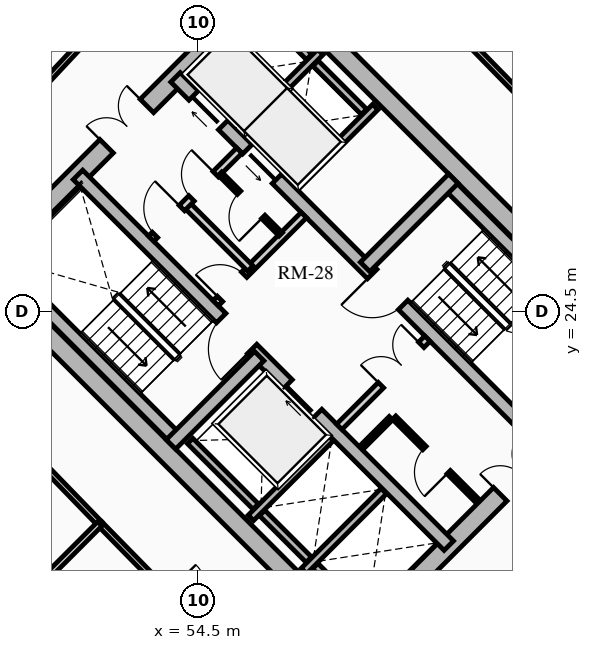
"""IFC4 building model, lengths in metres.
Left out: names, types, materials, properties, quantities, classifications, styles, units other than length and angle.
Written with IfcOpenShell. Run it as: python <this file> out.ifc"""

import sys

from ifc_helpers import new_model, si_unit, direction, frame, frame_2d, origin, place, context, subcontext, project, spatial, rectangle, extrude, source, transform, mapped, element, fill, save


model = new_model("IFC4")
c1 = context("Model", 3, precision=1e-05, world=origin(), true_north=direction((0.0, 1.0)))
c2 = subcontext(c1, "Body", "Model", "MODEL_VIEW")
j1 = project(units=[si_unit("LENGTHUNIT", "METRE"), si_unit("PLANEANGLEUNIT", "RADIAN")], contexts=[c1])
p1 = place(None, origin())
s1 = spatial("IfcSite", under=j1, at=p1, CompositionType="ELEMENT")
p2 = place(p1, origin())
s2 = spatial("IfcBuilding", under=s1, at=p2, CompositionType="ELEMENT")
p3 = place(p2, frame((0.0, 0.0, 48.19)))
s3 = spatial("IfcBuildingStorey", under=s2, at=p3, CompositionType="ELEMENT", Elevation=48.19)
for number, where, z_axis, x_axis in (
    (1, (58.773, 15.661, 0.0), (0.0, 0.0, 1.0), (-0.707, 0.707, 0.0)),
    (2, (66.339, 23.227, 0.0), (0.0, 0.0, 1.0), (-0.707, 0.707, 0.0)),
):
    element("IfcWall", number, at=place(p3, frame(where, z_axis=z_axis, x_axis=x_axis)), inside=s3, PredefinedType="SHEAR", context=c2, shape_type="SweptSolid", body=[
        extrude(rectangle(XDim=14.3, YDim=0.5, at=frame_2d((7.15, 0.0))), origin(), (0.0, 0.0, 1.0), 2.91),
    ])
p4 = place(p3, frame((58.596, 15.838, 0.0), z_axis=(0.0, 0.0, 1.0), x_axis=(0.707106781187, 0.707106781187, 0.0)))
e3 = element("IfcWall", 3, at=p4, inside=s3, PredefinedType="SHEAR", context=c2, shape_type="SweptSolid", body=[
    extrude(rectangle(XDim=10.7, YDim=0.5, at=frame_2d((5.35, 0.0))), origin(), (0.0, 0.0, 1.0), 2.91),
])
m1 = source(origin(), c2, "Body", "SweptSolid", [
    extrude(rectangle(XDim=1.5, YDim=2.02, at=frame_2d((0.75, 1.01))), frame((0.0, 0.26, 0.0), z_axis=(0.0, -1.0, 0.0), x_axis=(1.0, 0.0, 0.0)), (0.0, 0.0, 1.0), 0.52),
])
p5 = place(p4, frame((5.45, 0.0, 0.0)))
e4 = element("IfcOpeningElement", 4, at=p5, cuts=e3, PredefinedType="OPENING", context=c2, shape_type="MappedRepresentation", body=[
    mapped(m1, transform((0.0, 0.0, 0.0), x_axis=(1.0, 0.0, 0.0), y_axis=(0.0, 1.0, 0.0), z_axis=(0.0, 0.0, 1.0), scale=1.0)),
])
p6 = place(p3, frame((48.838, 25.596, 0.0), z_axis=(0.0, 0.0, 1.0), x_axis=(0.707106781187, 0.707106781187, 0.0)))
e5 = element("IfcWall", 5, at=p6, inside=s3, PredefinedType="SHEAR", context=c2, shape_type="SweptSolid", body=[
    extrude(rectangle(XDim=10.7, YDim=0.5, at=frame_2d((5.35, 0.0))), origin(), (0.0, 0.0, 1.0), 2.91),
])
p7 = place(p6, frame((4.6, 0.0, 0.0)))
e6 = element("IfcOpeningElement", 6, at=p7, cuts=e5, PredefinedType="OPENING", context=c2, shape_type="MappedRepresentation", body=[
    mapped(m1, transform((0.0, 0.0, 0.0), x_axis=(1.0, 0.0, 0.0), y_axis=(0.0, 1.0, 0.0), z_axis=(0.0, 0.0, 1.0), scale=1.0)),
])
p8 = place(p3, frame((61.096, 18.338, 0.0), z_axis=(0.0, 0.0, 1.0), x_axis=(-0.707106781187, 0.707106781187, 0.0)))
e7 = element("IfcWall", 7, at=p8, inside=s3, PredefinedType="SHEAR", context=c2, shape_type="SweptSolid", body=[
    extrude(rectangle(XDim=13.8, YDim=0.35, at=frame_2d((6.9, 0.0))), origin(), (0.0, 0.0, 1.0), 2.91),
])
m2 = source(origin(), c2, "Body", "SweptSolid", [
    extrude(rectangle(XDim=1.1, YDim=2.015, at=frame_2d((0.55, 1.007))), frame((0.0, 0.185, 0.0), z_axis=(0.0, -1.0, 0.0), x_axis=(1.0, 0.0, 0.0)), (0.0, 0.0, 1.0), 0.37),
])
p9 = place(p8, frame((4.9, 0.0, 0.0)))
e8 = element("IfcOpeningElement", 8, at=p9, cuts=e7, PredefinedType="OPENING", context=c2, shape_type="MappedRepresentation", body=[
    mapped(m2, transform((0.0, 0.0, 0.0), x_axis=(1.0, 0.0, 0.0), y_axis=(0.0, 1.0, 0.0), z_axis=(0.0, 0.0, 1.0), scale=1.0)),
])
m3 = source(origin(), c2, "Body", "SweptSolid", [
    extrude(rectangle(XDim=1.15, YDim=2.02, at=frame_2d((0.575, 1.01))), frame((0.0, 0.185, 0.0), z_axis=(0.0, -1.0, 0.0), x_axis=(1.0, 0.0, 0.0)), (0.0, 0.0, 1.0), 0.37),
])
p10 = place(p8, frame((7.32, 0.0, 0.0)))
e9 = element("IfcOpeningElement", 9, at=p10, cuts=e7, PredefinedType="OPENING", context=c2, shape_type="MappedRepresentation", body=[
    mapped(m3, transform((0.0, 0.0, 0.0), x_axis=(1.0, 0.0, 0.0), y_axis=(0.0, 1.0, 0.0), z_axis=(0.0, 0.0, 1.0), scale=1.0)),
])
p11 = place(p3, frame((63.662, 20.904, 0.0), z_axis=(0.0, 0.0, 1.0), x_axis=(-0.707106781187, 0.707106781187, 0.0)))
e10 = element("IfcWall", 10, at=p11, inside=s3, PredefinedType="SHEAR", context=c2, shape_type="SweptSolid", body=[
    extrude(rectangle(XDim=13.8, YDim=0.35, at=frame_2d((6.9, 0.0))), origin(), (0.0, 0.0, 1.0), 2.91),
])
p12 = place(p11, frame((10.025, 0.0, 0.0)))
e11 = element("IfcOpeningElement", 11, at=p12, cuts=e10, PredefinedType="OPENING", context=c2, shape_type="MappedRepresentation", body=[
    mapped(m2, transform((0.0, 0.0, 0.0), x_axis=(1.0, 0.0, 0.0), y_axis=(0.0, 1.0, 0.0), z_axis=(0.0, 0.0, 1.0), scale=1.0)),
])
p13 = place(p11, frame((12.025, 0.0, 0.0)))
e12 = element("IfcOpeningElement", 12, at=p13, cuts=e10, PredefinedType="OPENING", context=c2, shape_type="MappedRepresentation", body=[
    mapped(m2, transform((0.0, 0.0, 0.0), x_axis=(1.0, 0.0, 0.0), y_axis=(0.0, 1.0, 0.0), z_axis=(0.0, 0.0, 1.0), scale=1.0)),
])
p14 = place(p11, frame((5.33, 0.0, 0.0)))
e13 = element("IfcOpeningElement", 13, at=p14, cuts=e10, PredefinedType="OPENING", context=c2, shape_type="MappedRepresentation", body=[
    mapped(m3, transform((0.0, 0.0, 0.0), x_axis=(1.0, 0.0, 0.0), y_axis=(0.0, 1.0, 0.0), z_axis=(0.0, 0.0, 1.0), scale=1.0)),
])
p15 = place(p3, frame((53.922, 21.141, 0.0), z_axis=(0.0, 0.0, 1.0), x_axis=(-0.707106781187, 0.707106781187, 0.0)))
e14 = element("IfcWall", 14, at=p15, inside=s3, PredefinedType="SHEAR", context=c2, shape_type="SweptSolid", body=[
    extrude(rectangle(XDim=6.745, YDim=0.35, at=frame_2d((3.373, 0.0))), origin(), (0.0, 0.0, 1.0), 2.91),
])
p16 = place(p3, frame((53.784, 21.003, 0.0), z_axis=(0.0, 0.0, 1.0), x_axis=(0.707106781187, 0.707106781187, 0.0)))
e15 = element("IfcWall", 15, at=p16, inside=s3, PredefinedType="SHEAR", context=c2, shape_type="SweptSolid", body=[
    extrude(rectangle(XDim=3.285, YDim=0.35, at=frame_2d((1.643, 0.0))), origin(), (0.0, 0.0, 1.0), 2.91),
])
p17 = place(p3, frame((65.847, 23.089, 0.0), z_axis=(0.0, 0.0, 1.0), x_axis=(-0.707106781187, 0.707106781187, 0.0)))
e16 = element("IfcWall", 16, at=p17, inside=s3, PredefinedType="SHEAR", context=c2, shape_type="SweptSolid", body=[
    extrude(rectangle(XDim=6.745, YDim=0.35, at=frame_2d((3.373, 0.0))), origin(), (0.0, 0.0, 1.0), 2.91),
])
p18 = place(p3, frame((58.893, 25.674, 0.0), z_axis=(0.0, 0.0, 1.0), x_axis=(0.707106781187, 0.707106781187, 0.0)))
e17 = element("IfcWall", 17, at=p18, inside=s3, PredefinedType="SHEAR", context=c2, shape_type="SweptSolid", body=[
    extrude(rectangle(XDim=3.285, YDim=0.35, at=frame_2d((1.643, 0.0))), origin(), (0.0, 0.0, 1.0), 2.91),
])
p19 = place(p3, frame((55.888, 19.069, 0.0), z_axis=(0.0, 0.0, 1.0), x_axis=(0.707106781187, 0.707106781187, 0.0)))
e18 = element("IfcWall", 18, at=p19, inside=s3, PredefinedType="SHEAR", context=c2, shape_type="SweptSolid", body=[
    extrude(rectangle(XDim=2.97, YDim=0.2, at=frame_2d((1.485, 0.0))), origin(), (0.0, 0.0, 1.0), 2.91),
])
p20 = place(p3, frame((56.015, 19.366, 0.0), z_axis=(0.0, 0.0, 1.0), x_axis=(-0.707106781187, 0.707106781187, 0.0)))
e19 = element("IfcWall", 19, at=p20, inside=s3, PredefinedType="SHEAR", context=c2, shape_type="SweptSolid", body=[
    extrude(rectangle(XDim=2.44, YDim=0.2, at=frame_2d((1.22, 0.0))), origin(), (0.0, 0.0, 1.0), 2.91),
])
p21 = place(p3, frame((57.284, 17.673, 0.0), z_axis=(0.0, 0.0, 1.0), x_axis=(0.707147878904, 0.70706568108, 0.0)))
e20 = element("IfcWall", 20, at=p21, inside=s3, PredefinedType="SHEAR", context=c2, shape_type="SweptSolid", body=[
    extrude(rectangle(XDim=2.97, YDim=0.2, at=frame_2d((1.485, 0.0))), origin(), (0.0, 0.0, 1.0), 2.91),
])
p22 = place(p3, frame((57.412, 17.97, 0.0), z_axis=(0.0, 0.0, 1.0), x_axis=(-0.707106781187, 0.707106781187, 0.0)))
e21 = element("IfcWall", 21, at=p22, inside=s3, PredefinedType="SHEAR", context=c2, shape_type="SweptSolid", body=[
    extrude(rectangle(XDim=1.735, YDim=0.2, at=frame_2d((0.867, 0.0))), origin(), (0.0, 0.0, 1.0), 2.91),
])
p23 = place(p3, frame((58.737, 16.644, 0.0), z_axis=(0.0, 0.0, 1.0), x_axis=(-0.707032117043, 0.707181437447, 0.0)))
e22 = element("IfcWall", 22, at=p23, inside=s3, PredefinedType="SHEAR", context=c2, shape_type="SweptSolid", body=[
    extrude(rectangle(XDim=1.635, YDim=0.2, at=frame_2d((0.817, 0.0))), origin(), (0.0, 0.0, 1.0), 2.91),
])
p24 = place(p3, frame((57.062, 27.781, 0.0), z_axis=(0.0, 0.0, 1.0), x_axis=(0.707106781187, 0.707106781187, 0.0)))
e23 = element("IfcWall", 23, at=p24, inside=s3, PredefinedType="SHEAR", context=c2, shape_type="SweptSolid", body=[
    extrude(rectangle(XDim=2.97, YDim=0.2, at=frame_2d((1.485, 0.0))), origin(), (0.0, 0.0, 1.0), 2.91),
])
p25 = place(p3, frame((55.615, 29.227, 0.0), z_axis=(0.0, 0.0, 1.0), x_axis=(0.707147878904, 0.70706568108, 0.0)))
e24 = element("IfcWall", 24, at=p25, inside=s3, PredefinedType="SHEAR", context=c2, shape_type="SweptSolid", body=[
    extrude(rectangle(XDim=2.97, YDim=0.2, at=frame_2d((1.485, 0.0))), origin(), (0.0, 0.0, 1.0), 2.91),
])
p26 = place(p3, frame((58.865, 29.754, 0.0), z_axis=(0.0, 0.0, 1.0), x_axis=(-0.707174411312, 0.707039144592, 0.0)))
e25 = element("IfcWall", 25, at=p26, inside=s3, PredefinedType="SHEAR", context=c2, shape_type="SweptSolid", body=[
    extrude(rectangle(XDim=1.805, YDim=0.2, at=frame_2d((0.902, 0.0))), origin(), (0.0, 0.0, 1.0), 2.91),
])
p27 = place(p3, frame((57.419, 31.2, 0.0), z_axis=(0.0, 0.0, 1.0), x_axis=(-0.707032117043, 0.707181437447, 0.0)))
e26 = element("IfcWall", 26, at=p27, inside=s3, PredefinedType="SHEAR", context=c2, shape_type="SweptSolid", body=[
    extrude(rectangle(XDim=1.635, YDim=0.2, at=frame_2d((0.817, 0.0))), origin(), (0.0, 0.0, 1.0), 2.91),
])
p28 = place(p3, frame((58.214, 21.467, 0.0), z_axis=(0.0, 0.0, 1.0), x_axis=(0.707106781187, 0.707106781187, 0.0)))
e27 = element("IfcWall", 27, at=p28, inside=s3, PredefinedType="PARTITIONING", context=c2, shape_type="SweptSolid", body=[
    extrude(rectangle(XDim=3.28, YDim=0.2, at=frame_2d((1.64, 0.0))), origin(), (0.0, 0.0, 1.0), 2.635),
])
m4 = source(origin(), c2, "Body", "SweptSolid", [
    extrude(rectangle(XDim=1.5, YDim=2.02, at=frame_2d((0.75, 1.01))), frame((0.0, 0.11, 0.0), z_axis=(0.0, -1.0, 0.0), x_axis=(1.0, 0.0, 0.0)), (0.0, 0.0, 1.0), 0.22),
])
p29 = place(p28, frame((1.55, 0.0, 0.0)))
e28 = element("IfcOpeningElement", 28, at=p29, cuts=e27, PredefinedType="OPENING", context=c2, shape_type="MappedRepresentation", body=[
    mapped(m4, transform((0.0, 0.0, 0.0), x_axis=(1.0, 0.0, 0.0), y_axis=(0.0, 1.0, 0.0), z_axis=(0.0, 0.0, 1.0), scale=1.0)),
])
p30 = place(p3, frame((54.961, 24.719, 0.0), z_axis=(0.0, 0.0, 1.0), x_axis=(0.707106781187, 0.707106781187, 0.0)))
e29 = element("IfcWall", 29, at=p30, inside=s3, PredefinedType="PARTITIONING", context=c2, shape_type="SweptSolid", body=[
    extrude(rectangle(XDim=3.28, YDim=0.2, at=frame_2d((1.64, 0.0))), origin(), (0.0, 0.0, 1.0), 2.635),
])
m5 = source(origin(), c2, "Body", "SweptSolid", [
    extrude(rectangle(XDim=0.9, YDim=2.005, at=frame_2d((0.45, 1.002))), frame((0.0, 0.11, 0.0), z_axis=(0.0, -1.0, 0.0), x_axis=(1.0, 0.0, 0.0)), (0.0, 0.0, 1.0), 0.22),
])
p31 = place(p30, frame((0.16, 0.0, 0.0)))
e30 = element("IfcOpeningElement", 30, at=p31, cuts=e29, PredefinedType="OPENING", context=c2, shape_type="MappedRepresentation", body=[
    mapped(m5, transform((0.0, 0.0, 0.0), x_axis=(1.0, 0.0, 0.0), y_axis=(0.0, 1.0, 0.0), z_axis=(0.0, 0.0, 1.0), scale=1.0)),
])
p32 = place(p3, frame((55.874, 25.631, 0.0), z_axis=(0.0, 0.0, 1.0), x_axis=(-0.707157639372, 0.707055919343, 0.0)))
e31 = element("IfcWall", 31, at=p32, inside=s3, PredefinedType="PARTITIONING", context=c2, shape_type="SweptSolid", body=[
    extrude(rectangle(XDim=2.4, YDim=0.2, at=frame_2d((1.2, 0.0))), origin(), (0.0, 0.0, 1.0), 2.635),
])
p33 = place(p3, frame((53.264, 26.416, 0.0), z_axis=(0.0, 0.0, 1.0), x_axis=(0.707106781187, 0.707106781187, 0.0)))
e32 = element("IfcWall", 32, at=p33, inside=s3, PredefinedType="PARTITIONING", context=c2, shape_type="SweptSolid", body=[
    extrude(rectangle(XDim=3.28, YDim=0.2, at=frame_2d((1.64, 0.0))), origin(), (0.0, 0.0, 1.0), 2.635),
])
m6 = source(origin(), c2, "Body", "SweptSolid", [
    extrude(rectangle(XDim=1.0, YDim=2.015, at=frame_2d((0.5, 1.007))), frame((0.0, 0.11, 0.0), z_axis=(0.0, -1.0, 0.0), x_axis=(1.0, 0.0, 0.0)), (0.0, 0.0, 1.0), 0.22),
])
p34 = place(p33, frame((0.14, 0.0, 0.0)))
e33 = element("IfcOpeningElement", 33, at=p34, cuts=e32, PredefinedType="OPENING", context=c2, shape_type="MappedRepresentation", body=[
    mapped(m6, transform((0.0, 0.0, 0.0), x_axis=(1.0, 0.0, 0.0), y_axis=(0.0, 1.0, 0.0), z_axis=(0.0, 0.0, 1.0), scale=1.0)),
])
p35 = place(p33, frame((1.5, 0.0, 0.0)))
e34 = element("IfcOpeningElement", 34, at=p35, cuts=e32, PredefinedType="OPENING", context=c2, shape_type="MappedRepresentation", body=[
    mapped(m5, transform((0.0, 0.0, 0.0), x_axis=(1.0, 0.0, 0.0), y_axis=(0.0, 1.0, 0.0), z_axis=(0.0, 0.0, 1.0), scale=1.0)),
])
p36 = place(p3, frame((61.835, 19.529, 0.0), z_axis=(0.0, 0.0, 1.0), x_axis=(-0.707146413884, 0.707067146267, 0.0)))
e35 = element("IfcWall", 35, at=p36, inside=s3, PredefinedType="PARTITIONING", context=c2, shape_type="SweptSolid", body=[
    extrude(rectangle(XDim=3.08, YDim=0.125, at=frame_2d((1.54, 0.0))), origin(), (0.0, 0.0, 1.0), 2.635),
])
m7 = source(origin(), c2, "Body", "SweptSolid", [
    extrude(rectangle(XDim=0.9, YDim=2.005, at=frame_2d((0.45, 1.002))), frame((0.0, 0.073, 0.0), z_axis=(0.0, -1.0, 0.0), x_axis=(1.0, 0.0, 0.0)), (0.0, 0.0, 1.0), 0.145),
])
p37 = place(p36, frame((1.05, 0.0, 0.0)))
e36 = element("IfcOpeningElement", 36, at=p37, cuts=e35, PredefinedType="OPENING", context=c2, shape_type="MappedRepresentation", body=[
    mapped(m7, transform((0.0, 0.0, 0.0), x_axis=(1.0, 0.0, 0.0), y_axis=(0.0, 1.0, 0.0), z_axis=(0.0, 0.0, 1.0), scale=1.0)),
])
p38 = place(p3, frame((58.794, 20.915, 0.0), z_axis=(0.0, 0.0, 1.0), x_axis=(0.707106781187, 0.707106781187, 0.0)))
e37 = element("IfcWall", 37, at=p38, inside=s3, PredefinedType="PARTITIONING", context=c2, shape_type="SweptSolid", body=[
    extrude(rectangle(XDim=1.1, YDim=0.125, at=frame_2d((0.55, 0.0))), origin(), (0.0, 0.0, 1.0), 2.635),
])
p39 = place(p3, frame((56.673, 26.529, 0.0), z_axis=(0.0, 0.0, 1.0), x_axis=(-0.707052764397, 0.70716079385, 0.0)))
e38 = element("IfcWall", 38, at=p39, inside=s3, PredefinedType="PARTITIONING", context=c2, shape_type="SweptSolid", body=[
    extrude(rectangle(XDim=2.26, YDim=0.125, at=frame_2d((1.13, 0.0))), origin(), (0.0, 0.0, 1.0), 2.635),
])
p40 = place(p39, frame((0.65, 0.0, 0.0)))
e39 = element("IfcOpeningElement", 39, at=p40, cuts=e38, PredefinedType="OPENING", context=c2, shape_type="MappedRepresentation", body=[
    mapped(m7, transform((0.0, 0.0, 0.0), x_axis=(1.0, 0.0, 0.0), y_axis=(0.0, 1.0, 0.0), z_axis=(0.0, 0.0, 1.0), scale=1.0)),
])
p41 = place(p3, frame((63.086, 30.086, 0.0), z_axis=(0.0, 0.0, 1.0), x_axis=(-0.699032802832, 0.715089603172, 0.0)))
e40 = element("IfcWall", 40, at=p41, inside=s3, PredefinedType="PARTITIONING", context=c2, shape_type="SweptSolid", body=[
    extrude(rectangle(XDim=6.082, YDim=0.15, at=frame_2d((3.041, 0.0))), origin(), (0.0, 0.0, 1.0), 2.159),
])
m8 = source(origin(), c2, "Body", "SweptSolid", [
    extrude(rectangle(XDim=1.05, YDim=2.015, at=frame_2d((0.525, 1.007))), frame((0.0, 0.085, 0.0), z_axis=(0.0, -1.0, 0.0), x_axis=(1.0, 0.0, 0.0)), (0.0, 0.0, 1.0), 0.17),
])
p42 = place(p41, frame((2.516, 0.0, 0.0)))
e41 = element("IfcOpeningElement", 41, at=p42, cuts=e40, PredefinedType="OPENING", context=c2, shape_type="MappedRepresentation", body=[
    mapped(m8, transform((0.0, 0.0, 0.0), x_axis=(1.0, 0.0, 0.0), y_axis=(0.0, 1.0, 0.0), z_axis=(0.0, 0.0, 1.0), scale=1.0)),
])
p43 = place(p3, frame((52.079, 32.244, 0.0), z_axis=(0.0, 0.0, 1.0), x_axis=(-0.682703325574, -0.730695674854, 0.0)))
e42 = element("IfcWall", 42, at=p43, inside=s3, PredefinedType="PARTITIONING", context=c2, shape_type="SweptSolid", body=[
    extrude(rectangle(XDim=6.527, YDim=0.15, at=frame_2d((3.263, 0.0))), origin(), (0.0, 0.0, 1.0), 2.159),
])
p44 = place(p3, frame((47.729, 23.23, 0.0), z_axis=(0.0, 0.0, 1.0), x_axis=(0.696119834292, -0.717925606386, 0.0)))
e43 = element("IfcWall", 43, at=p44, inside=s3, PredefinedType="PARTITIONING", context=c2, shape_type="SweptSolid", body=[
    extrude(rectangle(XDim=6.012, YDim=0.15, at=frame_2d((3.006, 0.0))), origin(), (0.0, 0.0, 1.0), 2.635),
])
p45 = place(p3, frame((51.914, 18.914, 0.0), z_axis=(0.0, 0.0, 1.0), x_axis=(0.6999614951, -0.71418058317, 0.0)))
e44 = element("IfcWall", 44, at=p45, inside=s3, PredefinedType="PARTITIONING", context=c2, shape_type="SweptSolid", body=[
    extrude(rectangle(XDim=6.13, YDim=0.15, at=frame_2d((3.065, 0.0))), origin(), (0.0, 0.0, 1.0), 2.159),
])
p46 = place(p45, frame((2.54, 0.0, 0.0)))
e45 = element("IfcOpeningElement", 45, at=p46, cuts=e44, PredefinedType="OPENING", context=c2, shape_type="MappedRepresentation", body=[
    mapped(m8, transform((0.0, 0.0, 0.0), x_axis=(1.0, 0.0, 0.0), y_axis=(0.0, 1.0, 0.0), z_axis=(0.0, 0.0, 1.0), scale=1.0)),
])
p47 = place(p3, frame((51.914, 18.914, 0.0), z_axis=(0.0, 0.0, 1.0), x_axis=(-0.707106781187, -0.707106781187, 0.0)))
e46 = element("IfcWall", 46, at=p47, inside=s3, PredefinedType="PARTITIONING", context=c2, shape_type="SweptSolid", body=[
    extrude(rectangle(XDim=7.743, YDim=0.16, at=frame_2d((3.872, 0.0))), origin(), (0.0, 0.0, 1.0), 2.073),
])
m9 = source(origin(), c2, "Body", "SweptSolid", [
    extrude(rectangle(XDim=1.1, YDim=2.015, at=frame_2d((0.55, 1.007))), frame((0.0, 0.025, 0.0), z_axis=(0.0, -1.0, 0.0), x_axis=(1.0, 0.0, 0.0)), (0.0, 0.0, 1.0), 0.05),
])
p48 = place(p9, origin())
e47 = element("IfcDoor", 47, at=p48, inside=s3, OperationType="SLIDING_TO_RIGHT", PredefinedType="DOOR", context=c2, shape_type="MappedRepresentation", body=[
    mapped(m9, transform((0.0, 0.0, 0.0), x_axis=(1.0, 0.0, 0.0), y_axis=(0.0, 1.0, 0.0), z_axis=(0.0, 0.0, 1.0), scale=1.0)),
])
fill(e8, e47)
p49 = place(p12, origin())
e48 = element("IfcDoor", 48, at=p49, inside=s3, OperationType="SLIDING_TO_LEFT", PredefinedType="DOOR", context=c2, shape_type="MappedRepresentation", body=[
    mapped(m9, transform((0.0, 0.0, 0.0), x_axis=(1.0, 0.0, 0.0), y_axis=(0.0, 1.0, 0.0), z_axis=(0.0, 0.0, 1.0), scale=1.0)),
])
fill(e11, e48)
p50 = place(p13, origin())
e49 = element("IfcDoor", 49, at=p50, inside=s3, OperationType="SLIDING_TO_RIGHT", PredefinedType="DOOR", context=c2, shape_type="MappedRepresentation", body=[
    mapped(m9, transform((0.0, 0.0, 0.0), x_axis=(1.0, 0.0, 0.0), y_axis=(0.0, 1.0, 0.0), z_axis=(0.0, 0.0, 1.0), scale=1.0)),
])
fill(e12, e49)
m10 = source(origin(), c2, "Body", "SweptSolid", [
    extrude(rectangle(XDim=1.15, YDim=2.02, at=frame_2d((0.575, 1.01))), frame((0.0, 0.025, 0.0), z_axis=(0.0, -1.0, 0.0), x_axis=(1.0, 0.0, 0.0)), (0.0, 0.0, 1.0), 0.05),
])
p51 = place(p10, origin())
e50 = element("IfcDoor", 50, at=p51, inside=s3, OperationType="SINGLE_SWING_LEFT", PredefinedType="DOOR", context=c2, shape_type="MappedRepresentation", body=[
    mapped(m10, transform((0.0, 0.0, 0.0), x_axis=(1.0, 0.0, 0.0), y_axis=(0.0, 1.0, 0.0), z_axis=(0.0, 0.0, 1.0), scale=1.0)),
])
fill(e9, e50)
p52 = place(p14, origin())
e51 = element("IfcDoor", 51, at=p52, inside=s3, OperationType="SINGLE_SWING_RIGHT", PredefinedType="DOOR", context=c2, shape_type="MappedRepresentation", body=[
    mapped(m10, transform((0.0, 0.0, 0.0), x_axis=(1.0, 0.0, 0.0), y_axis=(0.0, 1.0, 0.0), z_axis=(0.0, 0.0, 1.0), scale=1.0)),
])
fill(e13, e51)
m11 = source(origin(), c2, "Body", "SweptSolid", [
    extrude(rectangle(XDim=1.5, YDim=2.02, at=frame_2d((0.75, 1.01))), frame((0.0, 0.025, 0.0), z_axis=(0.0, -1.0, 0.0), x_axis=(1.0, 0.0, 0.0)), (0.0, 0.0, 1.0), 0.05),
])
p53 = place(p7, origin())
e52 = element("IfcDoor", 52, at=p53, inside=s3, OperationType="DOUBLE_DOOR_SINGLE_SWING", PredefinedType="DOOR", context=c2, shape_type="MappedRepresentation", body=[
    mapped(m11, transform((0.0, 0.0, 0.0), x_axis=(1.0, 0.0, 0.0), y_axis=(0.0, 1.0, 0.0), z_axis=(0.0, 0.0, 1.0), scale=1.0)),
])
fill(e6, e52)
p54 = place(p5, origin())
e53 = element("IfcDoor", 53, at=p54, inside=s3, OperationType="DOUBLE_DOOR_SINGLE_SWING", PredefinedType="DOOR", context=c2, shape_type="MappedRepresentation", body=[
    mapped(m11, transform((0.0, 0.0, 0.0), x_axis=(1.0, 0.0, 0.0), y_axis=(0.0, 1.0, 0.0), z_axis=(0.0, 0.0, 1.0), scale=1.0)),
])
fill(e4, e53)
p55 = place(p29, origin())
e54 = element("IfcDoor", 54, at=p55, inside=s3, OperationType="DOUBLE_DOOR_SINGLE_SWING", PredefinedType="DOOR", context=c2, shape_type="MappedRepresentation", body=[
    mapped(m11, transform((0.0, 0.0, 0.0), x_axis=(1.0, 0.0, 0.0), y_axis=(0.0, 1.0, 0.0), z_axis=(0.0, 0.0, 1.0), scale=1.0)),
])
fill(e28, e54)
m12 = source(origin(), c2, "Body", "SweptSolid", [
    extrude(rectangle(XDim=0.9, YDim=2.005, at=frame_2d((0.45, 1.002))), frame((0.0, 0.025, 0.0), z_axis=(0.0, -1.0, 0.0), x_axis=(1.0, 0.0, 0.0)), (0.0, 0.0, 1.0), 0.05),
])
p56 = place(p31, origin())
e55 = element("IfcDoor", 55, at=p56, inside=s3, OperationType="SINGLE_SWING_LEFT", PredefinedType="DOOR", context=c2, shape_type="MappedRepresentation", body=[
    mapped(m12, transform((0.0, 0.0, 0.0), x_axis=(1.0, 0.0, 0.0), y_axis=(0.0, 1.0, 0.0), z_axis=(0.0, 0.0, 1.0), scale=1.0)),
])
fill(e30, e55)
m13 = source(origin(), c2, "Body", "SweptSolid", [
    extrude(rectangle(XDim=1.0, YDim=2.015, at=frame_2d((0.5, 1.007))), frame((0.0, 0.025, 0.0), z_axis=(0.0, -1.0, 0.0), x_axis=(1.0, 0.0, 0.0)), (0.0, 0.0, 1.0), 0.05),
])
p57 = place(p34, origin())
e56 = element("IfcDoor", 56, at=p57, inside=s3, OperationType="SINGLE_SWING_RIGHT", PredefinedType="DOOR", context=c2, shape_type="MappedRepresentation", body=[
    mapped(m13, transform((0.0, 0.0, 0.0), x_axis=(1.0, 0.0, 0.0), y_axis=(0.0, 1.0, 0.0), z_axis=(0.0, 0.0, 1.0), scale=1.0)),
])
fill(e33, e56)
p58 = place(p37, origin())
e57 = element("IfcDoor", 57, at=p58, inside=s3, OperationType="SINGLE_SWING_LEFT", PredefinedType="DOOR", context=c2, shape_type="MappedRepresentation", body=[
    mapped(m12, transform((0.0, 0.0, 0.0), x_axis=(1.0, 0.0, 0.0), y_axis=(0.0, 1.0, 0.0), z_axis=(0.0, 0.0, 1.0), scale=1.0)),
])
fill(e36, e57)
p59 = place(p35, origin())
e58 = element("IfcDoor", 58, at=p59, inside=s3, OperationType="SINGLE_SWING_RIGHT", PredefinedType="DOOR", context=c2, shape_type="MappedRepresentation", body=[
    mapped(m12, transform((0.0, 0.0, 0.0), x_axis=(1.0, 0.0, 0.0), y_axis=(0.0, 1.0, 0.0), z_axis=(0.0, 0.0, 1.0), scale=1.0)),
])
fill(e34, e58)
p60 = place(p40, origin())
e59 = element("IfcDoor", 59, at=p60, inside=s3, OperationType="SINGLE_SWING_LEFT", PredefinedType="DOOR", context=c2, shape_type="MappedRepresentation", body=[
    mapped(m12, transform((0.0, 0.0, 0.0), x_axis=(1.0, 0.0, 0.0), y_axis=(0.0, 1.0, 0.0), z_axis=(0.0, 0.0, 1.0), scale=1.0)),
])
fill(e39, e59)
save(model, sys.argv[1])
